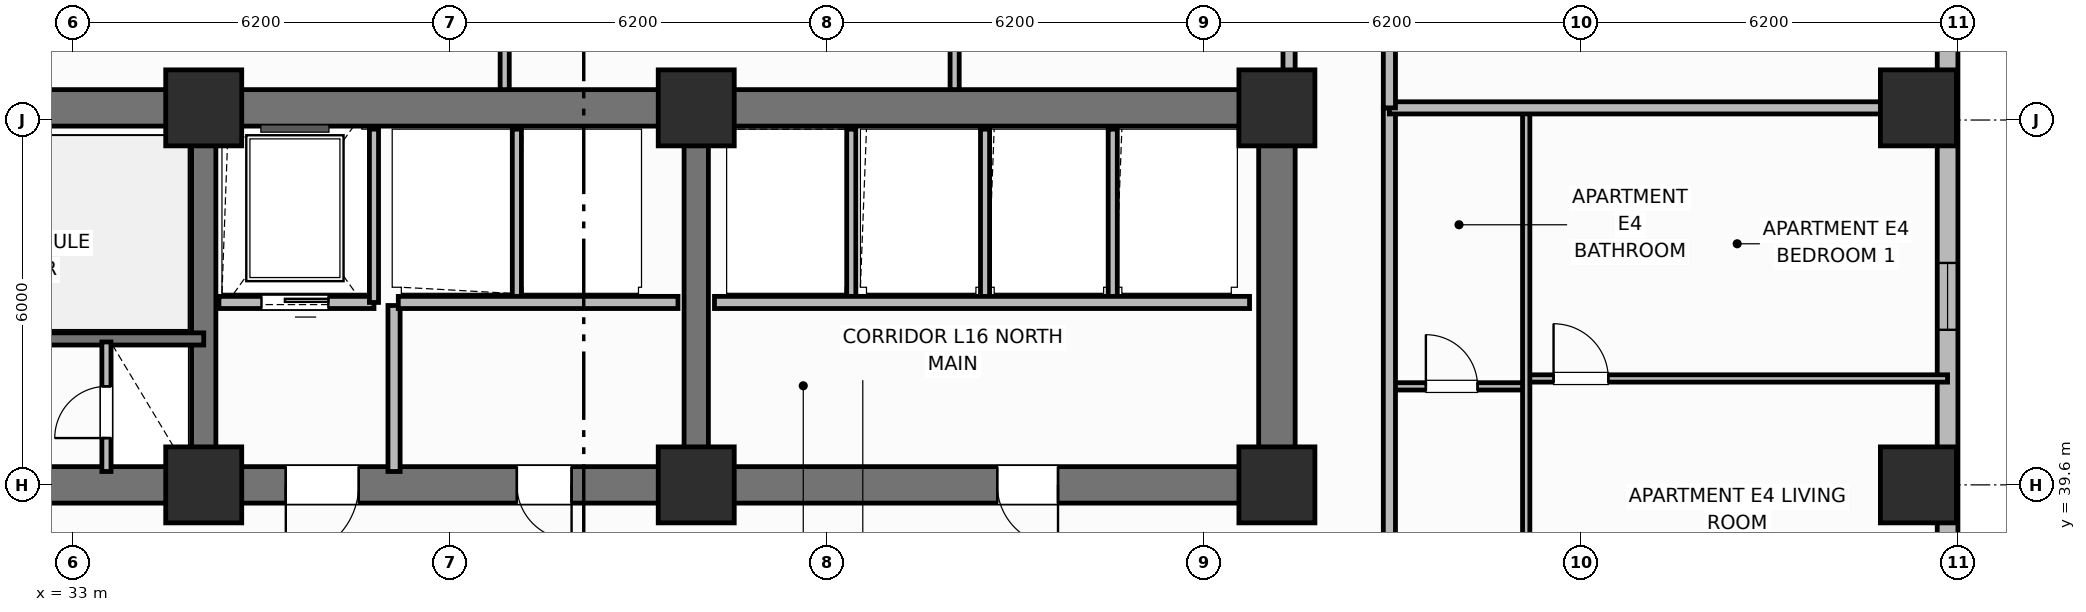
"""IFC4 building model, lengths in metres.
Left out: names, types, materials, properties, quantities, classifications, styles, units other than length and angle.
Written with IfcOpenShell. Run it as: python <this file> out.ifc"""

import sys

from ifc_helpers import new_model, si_unit, direction, frame, frame_2d, origin, origin_2d, place, context, subcontext, project, spatial, rectangle, extrude, element, fill, save


model = new_model("IFC4")
c1 = context("Model", 3, precision=1e-05, world=origin(), true_north=direction((0.0, 1.0)))
c2 = subcontext(c1, "Body", "Model", "MODEL_VIEW")
j1 = project(units=[si_unit("LENGTHUNIT", "METRE"), si_unit("PLANEANGLEUNIT", "RADIAN")], contexts=[c1])
p1 = place(None, origin())
s1 = spatial("IfcSite", under=j1, at=p1, CompositionType="ELEMENT")
p2 = place(p1, origin())
s2 = spatial("IfcBuilding", under=s1, at=p2, CompositionType="ELEMENT")
p3 = place(p2, frame((0.0, 0.0, 65.8)))
s3 = spatial("IfcBuildingStorey", under=s2, at=p3, CompositionType="ELEMENT", Elevation=65.8)
p4 = place(p3, frame((25.6, 45.8, 0.0), z_axis=(0.0, 0.0, 1.0), x_axis=(1.0, 0.0, 0.0)))
e1 = element("IfcWall", 1, at=p4, inside=s3, PredefinedType="SHEAR", context=c2, shape_type="SweptSolid", body=[
    extrude(rectangle(XDim=27.2, YDim=0.6, at=frame_2d((13.6, 0.0))), origin(), (0.0, 0.0, 1.0), 3.7),
])
p5 = place(p3, frame((52.8, 39.9, 0.0), z_axis=(0.0, 0.0, 1.0), x_axis=(0.0, 1.0, 0.0)))
e2 = element("IfcWall", 2, at=p5, inside=s3, PredefinedType="SHEAR", context=c2, shape_type="SweptSolid", body=[
    extrude(rectangle(XDim=5.6, YDim=0.6, at=frame_2d((2.8, 0.0))), origin(), (0.0, 0.0, 1.0), 3.7),
])
p6 = place(p3, frame((52.8, 39.6, 0.0), z_axis=(0.0, 0.0, 1.0), x_axis=(-1.0, 0.0, 0.0)))
e3 = element("IfcWall", 3, at=p6, inside=s3, PredefinedType="SHEAR", context=c2, shape_type="SweptSolid", body=[
    extrude(rectangle(XDim=27.2, YDim=0.6, at=frame_2d((13.6, 0.0))), origin(), (0.0, 0.0, 1.0), 3.7),
])
p7 = place(p6, frame((24.2, 0.0, 0.0)))
e4 = element("IfcOpeningElement", 4, at=p7, cuts=e3, PredefinedType="OPENING", context=c2, shape_type="SweptSolid", body=[
    extrude(rectangle(XDim=1.1, YDim=2.15, at=frame_2d((0.55, 1.075))), frame((0.0, 0.31, 0.0), z_axis=(0.0, -1.0, 0.0), x_axis=(1.0, 0.0, 0.0)), (0.0, 0.0, 1.0), 0.62),
])
p8 = place(p6, frame((15.1, 0.0, 0.0)))
e5 = element("IfcOpeningElement", 5, at=p8, cuts=e3, PredefinedType="OPENING", context=c2, shape_type="SweptSolid", body=[
    extrude(rectangle(XDim=1.2, YDim=2.15, at=frame_2d((0.6, 1.075))), frame((0.0, 0.31, 0.0), z_axis=(0.0, -1.0, 0.0), x_axis=(1.0, 0.0, 0.0)), (0.0, 0.0, 1.0), 0.62),
])
p9 = place(p6, frame((11.6, 0.0, 0.0)))
e6 = element("IfcOpeningElement", 6, at=p9, cuts=e3, PredefinedType="OPENING", context=c2, shape_type="SweptSolid", body=[
    extrude(rectangle(XDim=0.9, YDim=2.1, at=frame_2d((0.45, 1.05))), frame((0.0, 0.31, 0.0), z_axis=(0.0, -1.0, 0.0), x_axis=(1.0, 0.0, 0.0)), (0.0, 0.0, 1.0), 0.62),
])
p10 = place(p6, frame((3.6, 0.0, 0.0)))
e7 = element("IfcOpeningElement", 7, at=p10, cuts=e3, PredefinedType="OPENING", context=c2, shape_type="SweptSolid", body=[
    extrude(rectangle(XDim=1.0, YDim=2.15, at=frame_2d((0.5, 1.075))), frame((0.0, 0.31, 0.0), z_axis=(0.0, -1.0, 0.0), x_axis=(1.0, 0.0, 0.0)), (0.0, 0.0, 1.0), 0.62),
])
for number, where, z_axis, x_axis in (
    (8, (35.15, 39.9, 0.0), (0.0, 0.0, 1.0), (0.0, 1.0, 0.0)),
    (9, (43.25, 39.9, 0.0), (0.0, 0.0, 1.0), (0.0, 1.0, 0.0)),
):
    element("IfcWall", number, at=place(p3, frame(where, z_axis=z_axis, x_axis=x_axis)), inside=s3, PredefinedType="SHEAR", context=c2, shape_type="SweptSolid", body=[
        extrude(rectangle(XDim=5.6, YDim=0.4, at=frame_2d((2.8, 0.0))), origin(), (0.0, 0.0, 1.0), 3.7),
    ])
for number, where, z_axis, x_axis in (
    (10, (35.15, 39.6, 0.0), (0.0, 0.0, 1.0), (1.0, 0.0, 0.0)),
    (11, (35.15, 45.8, 0.0), (0.0, 0.0, 1.0), (1.0, 0.0, 0.0)),
    (12, (43.25, 39.6, 0.0), (0.0, 0.0, 1.0), (1.0, 0.0, 0.0)),
    (13, (43.25, 45.8, 0.0), (0.0, 0.0, 1.0), (1.0, 0.0, 0.0)),
    (14, (52.8, 39.6, 0.0), (0.0, 0.0, 1.0), (1.0, 0.0, 0.0)),
    (15, (52.8, 45.8, 0.0), (0.0, 0.0, 1.0), (1.0, 0.0, 0.0)),
    (16, (63.35, 39.6, 0.0), (0.0, 0.0, 1.0), (1.0, 0.0, 0.0)),
    (17, (63.35, 45.8, 0.0), (0.0, 0.0, 1.0), (1.0, 0.0, 0.0)),
):
    element("IfcColumn", number, at=place(p3, frame(where, z_axis=z_axis, x_axis=x_axis)), inside=s3, PredefinedType="COLUMN", context=c2, shape_type="SweptSolid", body=[
        extrude(rectangle(XDim=1.25, YDim=1.25, at=origin_2d()), origin(), (0.0, 0.0, 1.0), 3.7),
    ])
p11 = place(p3, frame((63.83, 32.6, 0.0), z_axis=(0.0, 0.0, 1.0), x_axis=(0.0, 1.0, 0.0)))
e18 = element("IfcWall", 18, at=p11, inside=s3, PredefinedType="SOLIDWALL", context=c2, shape_type="SweptSolid", body=[
    extrude(rectangle(XDim=14.8, YDim=0.34, at=frame_2d((7.4, 0.0))), origin(), (0.0, 0.0, 1.0), 2.7),
])
p12 = place(p11, frame((1.7, 0.0, 0.0)))
e19 = element("IfcOpeningElement", 19, at=p12, cuts=e18, PredefinedType="OPENING", context=c2, shape_type="SweptSolid", body=[
    extrude(rectangle(XDim=1.6, YDim=2.1, at=frame_2d((0.8, 1.05))), frame((0.0, 0.18, 0.0), z_axis=(0.0, -1.0, 0.0), x_axis=(1.0, 0.0, 0.0)), (0.0, 0.0, 1.0), 0.36),
])
p13 = place(p11, frame((9.55, 0.0, 0.93)))
e20 = element("IfcOpeningElement", 20, at=p13, cuts=e18, PredefinedType="OPENING", context=c2, shape_type="SweptSolid", body=[
    extrude(rectangle(XDim=1.1, YDim=1.65, at=frame_2d((0.55, 0.825))), frame((0.0, 0.18, 0.0), z_axis=(0.0, -1.0, 0.0), x_axis=(1.0, 0.0, 0.0)), (0.0, 0.0, 1.0), 0.36),
])
p14 = place(p3, frame((35.15, 42.0, 0.0), z_axis=(0.0, 0.0, 1.0), x_axis=(-1.0, 0.0, 0.0)))
e21 = element("IfcWall", 21, at=p14, inside=s3, PredefinedType="SHEAR", context=c2, shape_type="SweptSolid", body=[
    extrude(rectangle(XDim=9.55, YDim=0.2, at=frame_2d((4.775, 0.0))), origin(), (0.0, 0.0, 1.0), 3.7),
])
p15 = place(p14, frame((7.25, 0.0, 0.0)))
e22 = element("IfcOpeningElement", 22, at=p15, cuts=e21, PredefinedType="OPENING", context=c2, shape_type="SweptSolid", body=[
    extrude(rectangle(XDim=1.1, YDim=2.15, at=frame_2d((0.55, 1.075))), frame((0.0, 0.11, 0.0), z_axis=(0.0, -1.0, 0.0), x_axis=(1.0, 0.0, 0.0)), (0.0, 0.0, 1.0), 0.22),
])
p16 = place(p3, frame((33.55, 39.82, 0.0), z_axis=(0.0, 0.0, 1.0), x_axis=(0.0, 1.0, 0.0)))
e23 = element("IfcWall", 23, at=p16, inside=s3, PredefinedType="PARTITIONING", context=c2, shape_type="SweptSolid", body=[
    extrude(rectangle(XDim=2.13, YDim=0.15, at=frame_2d((1.065, 0.0))), origin(), (0.0, 0.0, 1.0), 2.53),
])
p17 = place(p16, frame((0.55, 0.0, 0.0)))
e24 = element("IfcOpeningElement", 24, at=p17, cuts=e23, PredefinedType="OPENING", context=c2, shape_type="SweptSolid", body=[
    extrude(rectangle(XDim=0.85, YDim=2.05, at=frame_2d((0.425, 1.025))), frame((0.0, 0.085, 0.0), z_axis=(0.0, -1.0, 0.0), x_axis=(1.0, 0.0, 0.0)), (0.0, 0.0, 1.0), 0.17),
])
p18 = place(p3, frame((37.95, 42.6, 0.0), z_axis=(0.0, 0.0, 1.0), x_axis=(-1.0, 0.0, 0.0)))
e25 = element("IfcWall", 25, at=p18, inside=s3, PredefinedType="PARTITIONING", context=c2, shape_type="SweptSolid", body=[
    extrude(rectangle(XDim=2.55, YDim=0.2, at=frame_2d((1.275, 0.0))), origin(), (0.0, 0.0, 1.0), 2.3),
])
p19 = place(p18, frame((0.75, 0.0, 0.0)))
e26 = element("IfcOpeningElement", 26, at=p19, cuts=e25, PredefinedType="OPENING", context=c2, shape_type="SweptSolid", body=[
    extrude(rectangle(XDim=1.1, YDim=2.15, at=frame_2d((0.55, 1.075))), frame((0.0, 0.11, 0.0), z_axis=(0.0, -1.0, 0.0), x_axis=(1.0, 0.0, 0.0)), (0.0, 0.0, 1.0), 0.22),
])
p20 = place(p3, frame((37.95, 42.6, 0.0), z_axis=(0.0, 0.0, 1.0), x_axis=(0.0, 1.0, 0.0)))
e27 = element("IfcWall", 27, at=p20, inside=s3, PredefinedType="PARTITIONING", context=c2, shape_type="SweptSolid", body=[
    extrude(rectangle(XDim=2.85, YDim=0.15, at=frame_2d((1.425, 0.0))), origin(), (0.0, 0.0, 1.0), 2.53),
])
p21 = place(p3, frame((38.28, 39.82, 0.0), z_axis=(0.0, 0.0, 1.0), x_axis=(0.0, 1.0, 0.0)))
e28 = element("IfcWall", 28, at=p21, inside=s3, PredefinedType="PARTITIONING", context=c2, shape_type="SweptSolid", body=[
    extrude(rectangle(XDim=2.73, YDim=0.2, at=frame_2d((1.365, 0.0))), origin(), (0.0, 0.0, 1.0), 2.53),
])
p22 = place(p3, frame((40.3, 42.65, 0.0), z_axis=(0.0, 0.0, 1.0), x_axis=(0.0, 1.0, 0.0)))
e29 = element("IfcWall", 29, at=p22, inside=s3, PredefinedType="PARTITIONING", context=c2, shape_type="SweptSolid", body=[
    extrude(rectangle(XDim=2.8, YDim=0.15, at=frame_2d((1.4, 0.0))), origin(), (0.0, 0.0, 1.0), 2.53),
])
p23 = place(p3, frame((42.95, 42.6, 0.0), z_axis=(0.0, 0.0, 1.0), x_axis=(-1.0, 0.0, 0.0)))
e30 = element("IfcWall", 30, at=p23, inside=s3, PredefinedType="PARTITIONING", context=c2, shape_type="SweptSolid", body=[
    extrude(rectangle(XDim=4.6, YDim=0.2, at=frame_2d((2.3, 0.0))), origin(), (0.0, 0.0, 1.0), 2.3),
])
for number, where, z_axis, x_axis in (
    (31, (45.8, 42.65, 0.0), (0.0, 0.0, 1.0), (0.0, 1.0, 0.0)),
    (32, (48.0, 42.65, 0.0), (0.0, 0.0, 1.0), (0.0, 1.0, 0.0)),
    (33, (50.1, 42.65, 0.0), (0.0, 0.0, 1.0), (0.0, 1.0, 0.0)),
):
    element("IfcWall", number, at=place(p3, frame(where, z_axis=z_axis, x_axis=x_axis)), inside=s3, PredefinedType="PARTITIONING", context=c2, shape_type="SweptSolid", body=[
        extrude(rectangle(XDim=2.8, YDim=0.15, at=frame_2d((1.4, 0.0))), origin(), (0.0, 0.0, 1.0), 2.53),
    ])
p24 = place(p3, frame((52.35, 42.6, 0.0), z_axis=(0.0, 0.0, 1.0), x_axis=(-1.0, 0.0, 0.0)))
e34 = element("IfcWall", 34, at=p24, inside=s3, PredefinedType="PARTITIONING", context=c2, shape_type="SweptSolid", body=[
    extrude(rectangle(XDim=8.8, YDim=0.2, at=frame_2d((4.4, 0.0))), origin(), (0.0, 0.0, 1.0), 2.53),
])
p25 = place(p3, frame((54.65, 41.22, 0.0), z_axis=(0.0, 0.0, 1.0), x_axis=(1.0, 0.0, 0.0)))
e35 = element("IfcWall", 35, at=p25, inside=s3, PredefinedType="PARTITIONING", context=c2, shape_type="SweptSolid", body=[
    extrude(rectangle(XDim=2.25, YDim=0.12, at=frame_2d((1.125, 0.0))), origin(), (0.0, 0.0, 1.0), 2.53),
])
p26 = place(p25, frame((0.6, 0.0, 0.0)))
e36 = element("IfcOpeningElement", 36, at=p26, cuts=e35, PredefinedType="OPENING", context=c2, shape_type="SweptSolid", body=[
    extrude(rectangle(XDim=0.85, YDim=2.1, at=frame_2d((0.425, 1.05))), frame((0.0, 0.07, 0.0), z_axis=(0.0, -1.0, 0.0), x_axis=(1.0, 0.0, 0.0)), (0.0, 0.0, 1.0), 0.14),
])
p27 = place(p3, frame((56.9, 41.35, 0.0), z_axis=(0.0, 0.0, 1.0), x_axis=(1.0, 0.0, 0.0)))
e37 = element("IfcWall", 37, at=p27, inside=s3, PredefinedType="PARTITIONING", context=c2, shape_type="SweptSolid", body=[
    extrude(rectangle(XDim=6.93, YDim=0.12, at=frame_2d((3.465, 0.0))), origin(), (0.0, 0.0, 1.0), 2.53),
])
p28 = place(p27, frame((0.45, 0.0, 0.0)))
e38 = element("IfcOpeningElement", 38, at=p28, cuts=e37, PredefinedType="OPENING", context=c2, shape_type="SweptSolid", body=[
    extrude(rectangle(XDim=0.9, YDim=2.1, at=frame_2d((0.45, 1.05))), frame((0.0, 0.07, 0.0), z_axis=(0.0, -1.0, 0.0), x_axis=(1.0, 0.0, 0.0)), (0.0, 0.0, 1.0), 0.14),
])
p29 = place(p3, frame((56.9, 37.04, 0.0), z_axis=(0.0, 0.0, 1.0), x_axis=(0.0, 1.0, 0.0)))
e39 = element("IfcWall", 39, at=p29, inside=s3, PredefinedType="PARTITIONING", context=c2, shape_type="SweptSolid", body=[
    extrude(rectangle(XDim=8.72, YDim=0.12, at=frame_2d((4.36, 0.0))), origin(), (0.0, 0.0, 1.0), 2.53),
])
p30 = place(p29, frame((0.41, 0.0, 0.0)))
e40 = element("IfcOpeningElement", 40, at=p30, cuts=e39, PredefinedType="OPENING", context=c2, shape_type="SweptSolid", body=[
    extrude(rectangle(XDim=0.9, YDim=2.1, at=frame_2d((0.45, 1.05))), frame((0.0, 0.07, 0.0), z_axis=(0.0, -1.0, 0.0), x_axis=(1.0, 0.0, 0.0)), (0.0, 0.0, 1.0), 0.14),
])
p31 = place(p3, frame((54.65, 10.6, 0.0), z_axis=(0.0, 0.0, 1.0), x_axis=(0.0, 1.0, 0.0)))
e41 = element("IfcWall", 41, at=p31, inside=s3, PredefinedType="PARTITIONING", context=c2, shape_type="SweptSolid", body=[
    extrude(rectangle(XDim=35.2, YDim=0.2, at=frame_2d((17.6, 0.0))), origin(), (0.0, 0.0, 1.0), 2.53),
])
p32 = place(p31, frame((2.65, 0.0, 0.0)))
e42 = element("IfcOpeningElement", 42, at=p32, cuts=e41, PredefinedType="OPENING", context=c2, shape_type="SweptSolid", body=[
    extrude(rectangle(XDim=1.0, YDim=2.15, at=frame_2d((0.5, 1.075))), frame((0.0, 0.11, 0.0), z_axis=(0.0, -1.0, 0.0), x_axis=(1.0, 0.0, 0.0)), (0.0, 0.0, 1.0), 0.22),
])
p33 = place(p31, frame((10.81, 0.0, 0.0)))
e43 = element("IfcOpeningElement", 43, at=p33, cuts=e41, PredefinedType="OPENING", context=c2, shape_type="SweptSolid", body=[
    extrude(rectangle(XDim=1.0, YDim=2.15, at=frame_2d((0.5, 1.075))), frame((0.0, 0.11, 0.0), z_axis=(0.0, -1.0, 0.0), x_axis=(1.0, 0.0, 0.0)), (0.0, 0.0, 1.0), 0.22),
])
p34 = place(p31, frame((19.54, 0.0, 0.0)))
e44 = element("IfcOpeningElement", 44, at=p34, cuts=e41, PredefinedType="OPENING", context=c2, shape_type="SweptSolid", body=[
    extrude(rectangle(XDim=1.0, YDim=2.15, at=frame_2d((0.5, 1.075))), frame((0.0, 0.11, 0.0), z_axis=(0.0, -1.0, 0.0), x_axis=(1.0, 0.0, 0.0)), (0.0, 0.0, 1.0), 0.22),
])
p35 = place(p31, frame((26.95, 0.0, 0.0)))
e45 = element("IfcOpeningElement", 45, at=p35, cuts=e41, PredefinedType="OPENING", context=c2, shape_type="SweptSolid", body=[
    extrude(rectangle(XDim=1.0, YDim=2.15, at=frame_2d((0.5, 1.075))), frame((0.0, 0.11, 0.0), z_axis=(0.0, -1.0, 0.0), x_axis=(1.0, 0.0, 0.0)), (0.0, 0.0, 1.0), 0.22),
])
p36 = place(p3, frame((54.65, 45.8, 0.0), z_axis=(0.0, 0.0, 1.0), x_axis=(1.0, 0.0, 0.0)))
e46 = element("IfcWall", 46, at=p36, inside=s3, PredefinedType="PARTITIONING", context=c2, shape_type="SweptSolid", body=[
    extrude(rectangle(XDim=8.76, YDim=0.2, at=frame_2d((4.38, 0.0))), origin(), (0.0, 0.0, 1.0), 2.53),
])
p37 = place(p3, frame((54.65, 45.8, 0.0), z_axis=(0.0, 0.0, 1.0), x_axis=(0.0, 1.0, 0.0)))
e47 = element("IfcWall", 47, at=p37, inside=s3, PredefinedType="PARTITIONING", context=c2, shape_type="SweptSolid", body=[
    extrude(rectangle(XDim=5.63, YDim=0.2, at=frame_2d((2.815, 0.0))), origin(), (0.0, 0.0, 1.0), 2.53),
])
p38 = place(p3, frame((40.1, 46.1, 0.0), z_axis=(0.0, 0.0, 1.0), x_axis=(0.0, 1.0, 0.0)))
e48 = element("IfcWall", 48, at=p38, inside=s3, PredefinedType="PARTITIONING", context=c2, shape_type="SweptSolid", body=[
    extrude(rectangle(XDim=5.33, YDim=0.15, at=frame_2d((2.665, 0.0))), origin(), (0.0, 0.0, 1.0), 2.53),
])
p39 = place(p3, frame((47.5, 46.1, 0.0), z_axis=(0.0, 0.0, 1.0), x_axis=(0.0, 1.0, 0.0)))
e49 = element("IfcWall", 49, at=p39, inside=s3, PredefinedType="PARTITIONING", context=c2, shape_type="SweptSolid", body=[
    extrude(rectangle(XDim=5.33, YDim=0.15, at=frame_2d((2.665, 0.0))), origin(), (0.0, 0.0, 1.0), 2.53),
])
p40 = place(p39, frame((0.85, 0.0, 0.0)))
e50 = element("IfcOpeningElement", 50, at=p40, cuts=e49, PredefinedType="OPENING", context=c2, shape_type="SweptSolid", body=[
    extrude(rectangle(XDim=0.9, YDim=2.1, at=frame_2d((0.45, 1.05))), frame((0.0, 0.085, 0.0), z_axis=(0.0, -1.0, 0.0), x_axis=(1.0, 0.0, 0.0)), (0.0, 0.0, 1.0), 0.17),
])
p41 = place(p3, frame((53.0, 46.1, 0.0), z_axis=(0.0, 0.0, 1.0), x_axis=(0.0, 1.0, 0.0)))
e51 = element("IfcWall", 51, at=p41, inside=s3, PredefinedType="PARTITIONING", context=c2, shape_type="SweptSolid", body=[
    extrude(rectangle(XDim=4.58, YDim=0.2, at=frame_2d((2.29, 0.0))), origin(), (0.0, 0.0, 1.0), 2.53),
])
p42 = place(p41, frame((1.05, 0.0, 0.0)))
e52 = element("IfcOpeningElement", 52, at=p42, cuts=e51, PredefinedType="OPENING", context=c2, shape_type="SweptSolid", body=[
    extrude(rectangle(XDim=0.9, YDim=2.1, at=frame_2d((0.45, 1.05))), frame((0.0, 0.11, 0.0), z_axis=(0.0, -1.0, 0.0), x_axis=(1.0, 0.0, 0.0)), (0.0, 0.0, 1.0), 0.22),
])
p43 = place(p13, origin())
e53 = element("IfcWindow", 53, at=p43, inside=s3, PartitioningType="SINGLE_PANEL", PredefinedType="WINDOW", context=c2, shape_type="SweptSolid", body=[
    extrude(rectangle(XDim=1.1, YDim=1.65, at=frame_2d((0.55, 0.825))), frame((0.0, 0.03, 0.0), z_axis=(0.0, -1.0, 0.0), x_axis=(1.0, 0.0, 0.0)), (0.0, 0.0, 1.0), 0.06),
])
fill(e20, e53)
p44 = place(p17, origin())
e54 = element("IfcDoor", 54, at=p44, inside=s3, OperationType="SINGLE_SWING_LEFT", PredefinedType="TRAPDOOR", context=c2, shape_type="SweptSolid", body=[
    extrude(rectangle(XDim=0.85, YDim=2.05, at=frame_2d((0.425, 1.025))), frame((0.0, 0.025, 0.0), z_axis=(0.0, -1.0, 0.0), x_axis=(1.0, 0.0, 0.0)), (0.0, 0.0, 1.0), 0.05),
])
fill(e24, e54)
p45 = place(p19, origin())
e55 = element("IfcDoor", 55, at=p45, inside=s3, OperationType="SLIDING_TO_LEFT", PredefinedType="DOOR", context=c2, shape_type="SweptSolid", body=[
    extrude(rectangle(XDim=1.1, YDim=2.15, at=frame_2d((0.55, 1.075))), frame((0.0, 0.025, 0.0), z_axis=(0.0, -1.0, 0.0), x_axis=(1.0, 0.0, 0.0)), (0.0, 0.0, 1.0), 0.05),
])
fill(e26, e55)
p46 = place(p26, origin())
e56 = element("IfcDoor", 56, at=p46, inside=s3, OperationType="SINGLE_SWING_LEFT", PredefinedType="DOOR", context=c2, shape_type="SweptSolid", body=[
    extrude(rectangle(XDim=0.85, YDim=2.1, at=frame_2d((0.425, 1.05))), frame((0.0, 0.025, 0.0), z_axis=(0.0, -1.0, 0.0), x_axis=(1.0, 0.0, 0.0)), (0.0, 0.0, 1.0), 0.05),
])
fill(e36, e56)
p47 = place(p28, origin())
e57 = element("IfcDoor", 57, at=p47, inside=s3, OperationType="SINGLE_SWING_LEFT", PredefinedType="DOOR", context=c2, shape_type="SweptSolid", body=[
    extrude(rectangle(XDim=0.9, YDim=2.1, at=frame_2d((0.45, 1.05))), frame((0.0, 0.025, 0.0), z_axis=(0.0, -1.0, 0.0), x_axis=(1.0, 0.0, 0.0)), (0.0, 0.0, 1.0), 0.05),
])
fill(e38, e57)
p48 = place(p8, origin())
e58 = element("IfcDoor", 58, at=p48, inside=s3, OperationType="SINGLE_SWING_RIGHT", PredefinedType="DOOR", context=c2, shape_type="SweptSolid", body=[
    extrude(rectangle(XDim=1.2, YDim=2.15, at=frame_2d((0.6, 1.075))), frame((0.0, 0.025, 0.0), z_axis=(0.0, -1.0, 0.0), x_axis=(1.0, 0.0, 0.0)), (0.0, 0.0, 1.0), 0.05),
])
fill(e5, e58)
p49 = place(p9, origin())
e59 = element("IfcDoor", 59, at=p49, inside=s3, OperationType="SINGLE_SWING_LEFT", PredefinedType="DOOR", context=c2, shape_type="SweptSolid", body=[
    extrude(rectangle(XDim=0.9, YDim=2.1, at=frame_2d((0.45, 1.05))), frame((0.0, 0.025, 0.0), z_axis=(0.0, -1.0, 0.0), x_axis=(1.0, 0.0, 0.0)), (0.0, 0.0, 1.0), 0.05),
])
fill(e6, e59)
p50 = place(p10, origin())
e60 = element("IfcDoor", 60, at=p50, inside=s3, OperationType="SINGLE_SWING_LEFT", PredefinedType="DOOR", context=c2, shape_type="SweptSolid", body=[
    extrude(rectangle(XDim=1.0, YDim=2.15, at=frame_2d((0.5, 1.075))), frame((0.0, 0.025, 0.0), z_axis=(0.0, -1.0, 0.0), x_axis=(1.0, 0.0, 0.0)), (0.0, 0.0, 1.0), 0.05),
])
fill(e7, e60)
save(model, sys.argv[1])
